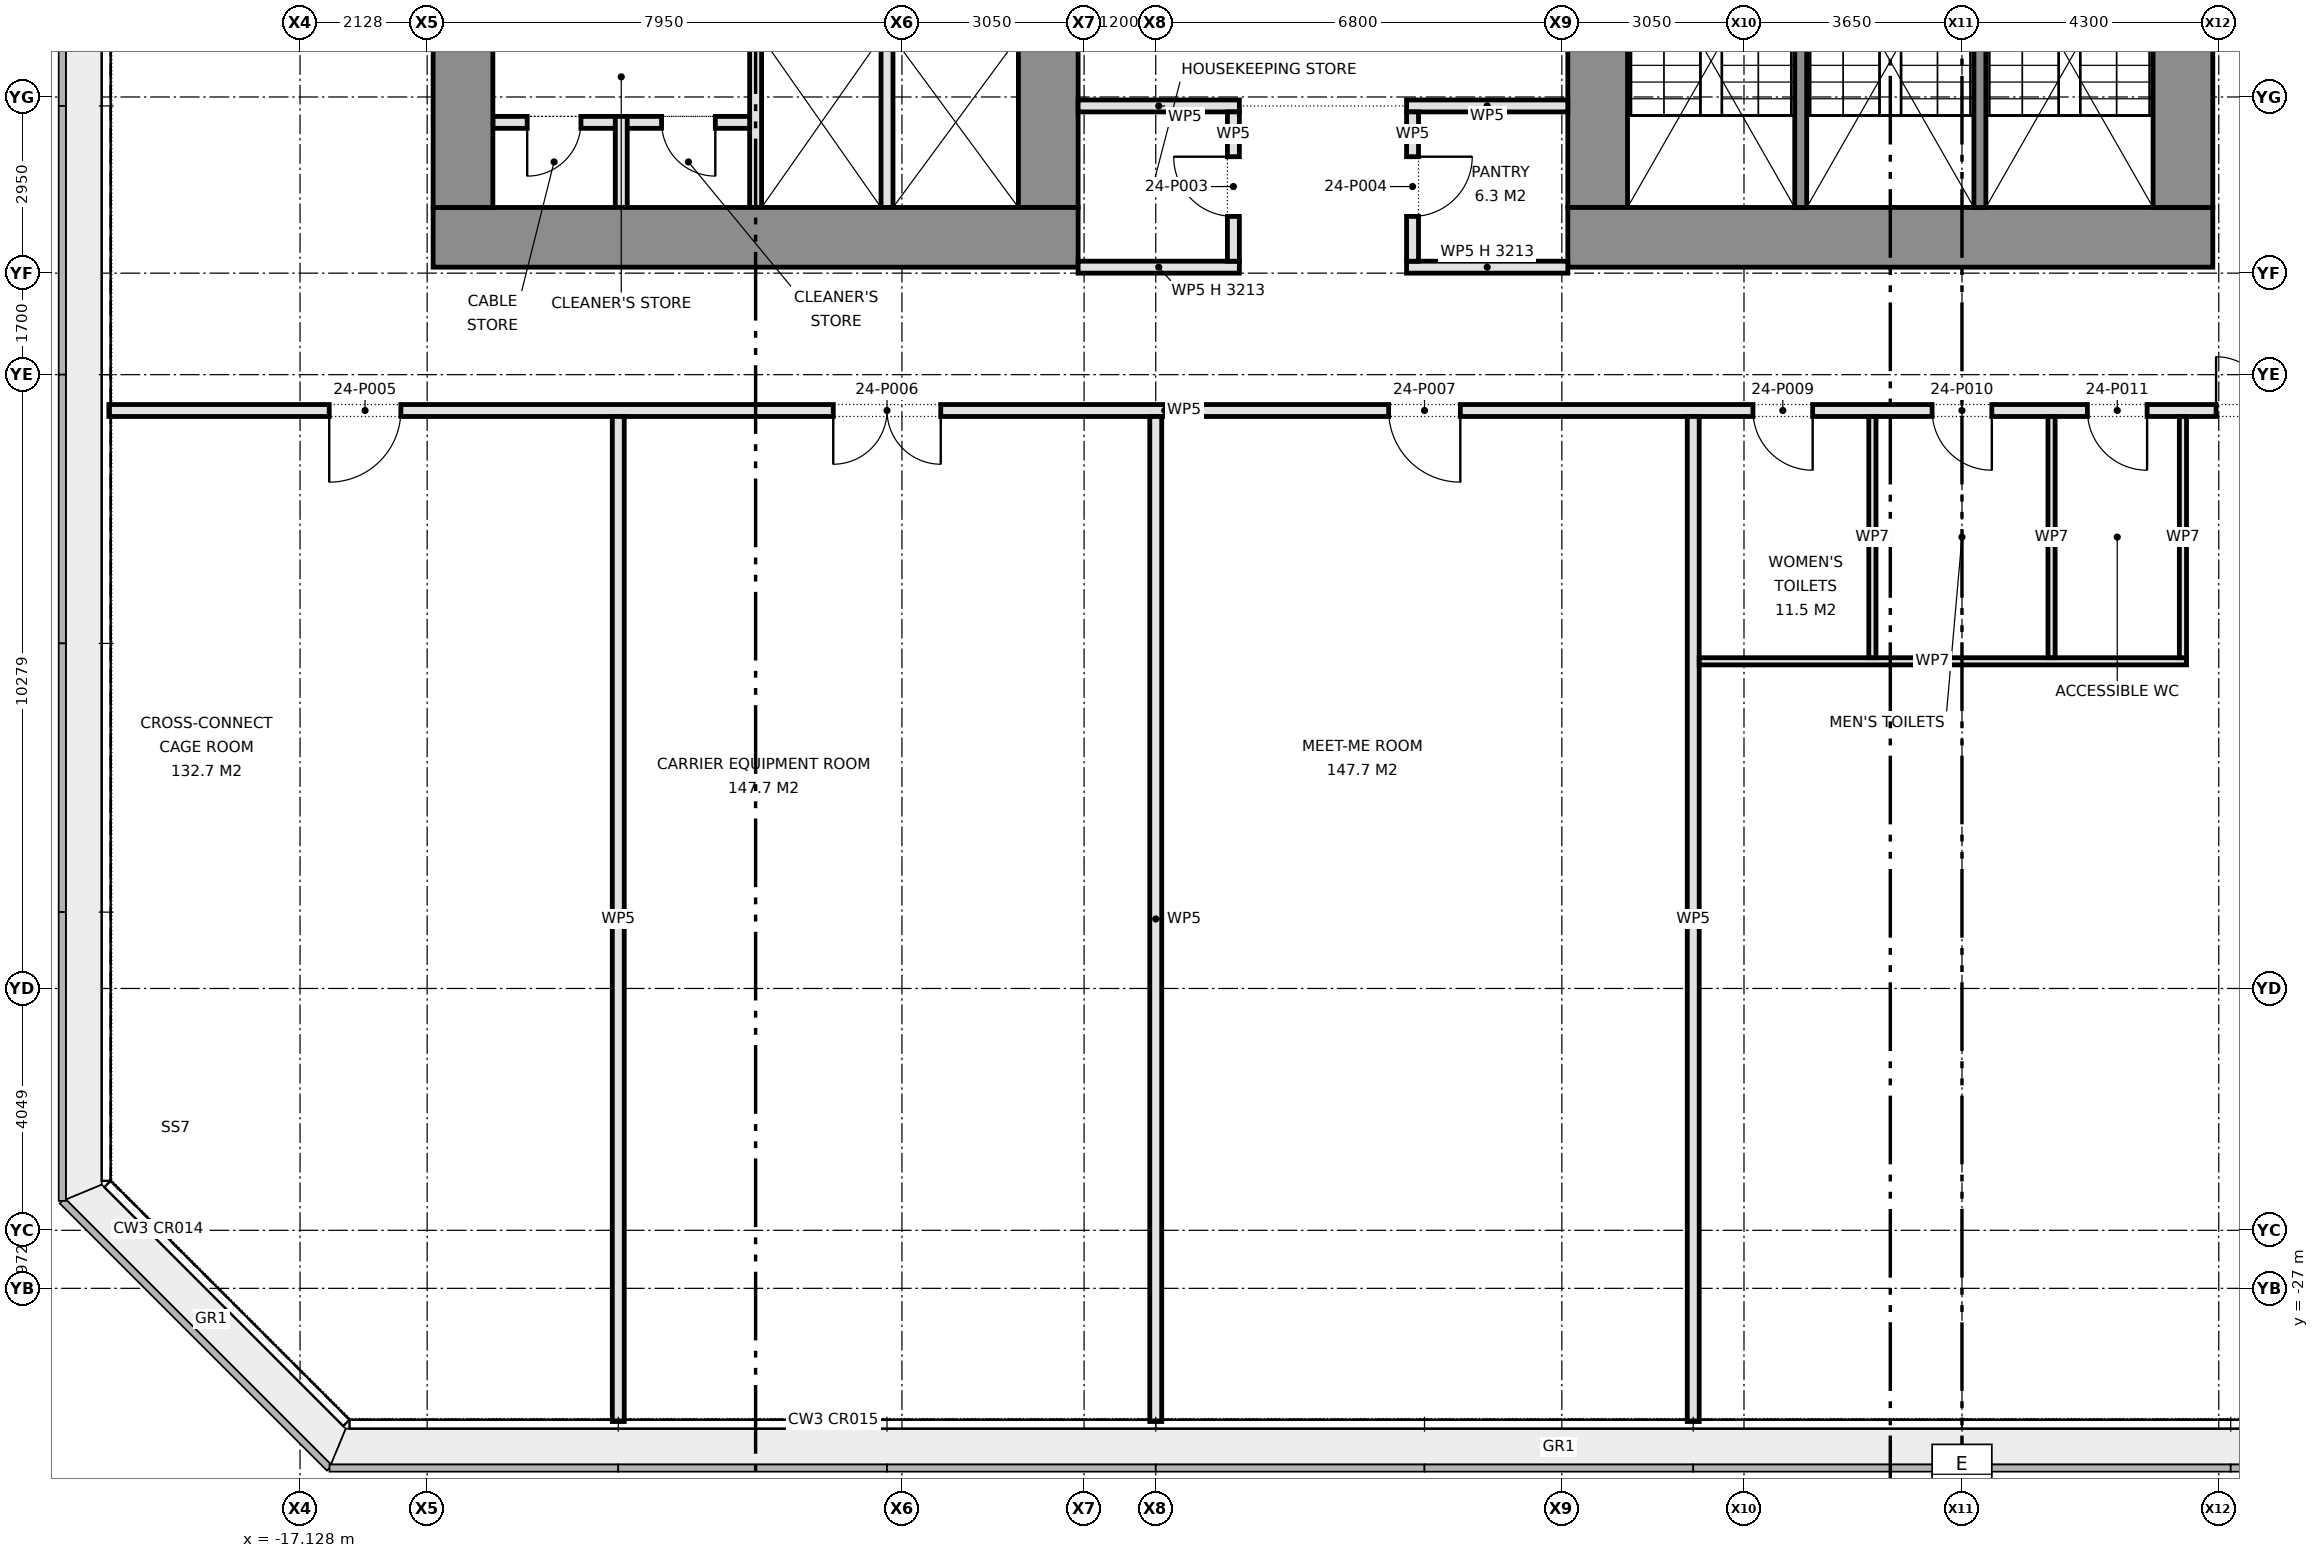
"""IFC4 building model, lengths in metres.
Left out: names, types, materials, properties, quantities, classifications, styles, units other than length and angle.
Written with IfcOpenShell. Run it as: python <this file> out.ifc"""

import sys

from ifc_helpers import new_model, si_unit, direction, frame, frame_2d, origin, place, context, subcontext, project, spatial, rectangle, extrude, element, fill, save


model = new_model("IFC4")
c1 = context("Model", 3, precision=1e-05, world=origin(), true_north=direction((0.0, 1.0)))
c2 = subcontext(c1, "Body", "Model", "MODEL_VIEW")
j1 = project(units=[si_unit("LENGTHUNIT", "METRE"), si_unit("PLANEANGLEUNIT", "RADIAN")], contexts=[c1])
p1 = place(None, origin())
s1 = spatial("IfcSite", under=j1, at=p1, CompositionType="ELEMENT")
p2 = place(p1, origin())
s2 = spatial("IfcBuilding", under=s1, at=p2, CompositionType="ELEMENT")
p3 = place(p2, frame((0.0, 0.0, 108.4)))
s3 = spatial("IfcBuildingStorey", under=s2, at=p3, CompositionType="ELEMENT", Elevation=108.4)
p4 = place(p3, frame((-14.9, -9.4, 0.0), z_axis=(0.0, 0.0, 1.0), x_axis=(1.0, 0.0, 0.0)))
e1 = element("IfcWall", 1, at=p4, inside=s3, PredefinedType="SHEAR", context=c2, shape_type="SweptSolid", body=[
    extrude(rectangle(XDim=10.8, YDim=1.0, at=frame_2d((5.4, 0.0))), origin(), (0.0, 0.0, 1.0), 4.15),
])
for number, where, z_axis, x_axis in (
    (2, (-14.4, -8.9, 0.0), (0.0, 0.0, 1.0), (0.0, 1.0, 0.0)),
    (3, (-4.6, -8.9, 0.0), (0.0, 0.0, 1.0), (0.0, 1.0, 0.0)),
):
    element("IfcWall", number, at=place(p3, frame(where, z_axis=z_axis, x_axis=x_axis)), inside=s3, PredefinedType="SHEAR", context=c2, shape_type="SweptSolid", body=[
        extrude(rectangle(XDim=3.15, YDim=1.0, at=frame_2d((1.575, 0.0))), origin(), (0.0, 0.0, 1.0), 4.15),
    ])
for number, where, z_axis, x_axis in (
    (4, (-9.5, -8.9, 0.0), (0.0, 0.0, 1.0), (0.0, 1.0, 0.0)),
    (5, (-7.3, -8.9, 0.0), (0.0, 0.0, 1.0), (0.0, 1.0, 0.0)),
):
    element("IfcWall", number, at=place(p3, frame(where, z_axis=z_axis, x_axis=x_axis)), inside=s3, PredefinedType="PARTITIONING", context=c2, shape_type="SweptSolid", body=[
        extrude(rectangle(XDim=2.85, YDim=0.2, at=frame_2d((1.425, 0.0))), origin(), (0.0, 0.0, 1.0), 4.15),
    ])
p5 = place(p3, frame((-13.9, -7.475, 0.0), z_axis=(0.0, 0.0, 1.0), x_axis=(1.0, 0.0, 0.0)))
e6 = element("IfcWall", 6, at=p5, inside=s3, PredefinedType="PARTITIONING", context=c2, shape_type="SweptSolid", body=[
    extrude(rectangle(XDim=4.3, YDim=0.2, at=frame_2d((2.15, 0.0))), origin(), (0.0, 0.0, 1.0), 4.15),
])
p6 = place(p5, frame((0.575, 0.0, 0.0)))
e7 = element("IfcOpeningElement", 7, at=p6, cuts=e6, PredefinedType="OPENING", context=c2, shape_type="SweptSolid", body=[
    extrude(rectangle(XDim=0.9, YDim=2.1, at=frame_2d((0.45, 1.05))), frame((0.0, 0.11, 0.0), z_axis=(0.0, -1.0, 0.0), x_axis=(1.0, 0.0, 0.0)), (0.0, 0.0, 1.0), 0.22),
])
p7 = place(p5, frame((2.825, 0.0, 0.0)))
e8 = element("IfcOpeningElement", 8, at=p7, cuts=e6, PredefinedType="OPENING", context=c2, shape_type="SweptSolid", body=[
    extrude(rectangle(XDim=0.9, YDim=2.1, at=frame_2d((0.45, 1.05))), frame((0.0, 0.11, 0.0), z_axis=(0.0, -1.0, 0.0), x_axis=(1.0, 0.0, 0.0)), (0.0, 0.0, 1.0), 0.22),
])
p8 = place(p3, frame((-11.75, -8.9, 0.0), z_axis=(0.0, 0.0, 1.0), x_axis=(0.0, 1.0, 0.0)))
e9 = element("IfcWall", 9, at=p8, inside=s3, PredefinedType="PARTITIONING", context=c2, shape_type="SweptSolid", body=[
    extrude(rectangle(XDim=1.525, YDim=0.2, at=frame_2d((0.762, 0.0))), origin(), (0.0, 0.0, 1.0), 4.15),
])
p9 = place(p3, frame((14.9, -9.4, 0.0), z_axis=(0.0, 0.0, 1.0), x_axis=(-1.0, 0.0, 0.0)))
e10 = element("IfcWall", 10, at=p9, inside=s3, PredefinedType="SHEAR", context=c2, shape_type="SweptSolid", body=[
    extrude(rectangle(XDim=10.8, YDim=1.0, at=frame_2d((5.4, 0.0))), origin(), (0.0, 0.0, 1.0), 4.15),
])
p10 = place(p3, frame((14.4, -3.68, 0.0), z_axis=(0.0, 0.0, 1.0), x_axis=(0.0, -1.0, 0.0)))
e11 = element("IfcWall", 11, at=p10, inside=s3, PredefinedType="SHEAR", context=c2, shape_type="SweptSolid", body=[
    extrude(rectangle(XDim=5.22, YDim=1.0, at=frame_2d((2.61, 0.0))), origin(), (0.0, 0.0, 1.0), 4.15),
])
p11 = place(p3, frame((4.6, -1.55, 0.0), z_axis=(0.0, 0.0, 1.0), x_axis=(0.0, -1.0, 0.0)))
e12 = element("IfcWall", 12, at=p11, inside=s3, PredefinedType="SHEAR", context=c2, shape_type="SweptSolid", body=[
    extrude(rectangle(XDim=7.35, YDim=1.0, at=frame_2d((3.675, 0.0))), origin(), (0.0, 0.0, 1.0), 4.15),
])
for number, where, z_axis, x_axis in (
    (13, (11.0, -2.38, 0.0), (0.0, 0.0, 1.0), (0.0, -1.0, 0.0)),
    (14, (8.0, -2.38, 0.0), (0.0, 0.0, 1.0), (0.0, -1.0, 0.0)),
):
    element("IfcWall", number, at=place(p3, frame(where, z_axis=z_axis, x_axis=x_axis)), inside=s3, PredefinedType="SHEAR", context=c2, shape_type="SweptSolid", body=[
        extrude(rectangle(XDim=6.52, YDim=0.2, at=frame_2d((3.26, 0.0))), origin(), (0.0, 0.0, 1.0), 4.15),
    ])
p12 = place(p3, frame((-20.33, -12.3, 0.0), z_axis=(0.0, 0.0, 1.0), x_axis=(1.0, 0.0, 0.0)))
e15 = element("IfcWall", 15, at=p12, inside=s3, PredefinedType="PARTITIONING", context=c2, shape_type="SweptSolid", body=[
    extrude(rectangle(XDim=37.73, YDim=0.2, at=frame_2d((18.865, 0.0))), origin(), (0.0, 0.0, 1.0), 4.15),
])
p13 = place(p12, frame((3.69, 0.0, 0.0)))
e16 = element("IfcOpeningElement", 16, at=p13, cuts=e15, PredefinedType="OPENING", context=c2, shape_type="SweptSolid", body=[
    extrude(rectangle(XDim=1.2, YDim=2.1, at=frame_2d((0.6, 1.05))), frame((0.0, 0.11, 0.0), z_axis=(0.0, -1.0, 0.0), x_axis=(1.0, 0.0, 0.0)), (0.0, 0.0, 1.0), 0.22),
])
p14 = place(p12, frame((12.13, 0.0, 0.0)))
e17 = element("IfcOpeningElement", 17, at=p14, cuts=e15, PredefinedType="OPENING", context=c2, shape_type="SweptSolid", body=[
    extrude(rectangle(XDim=1.8, YDim=2.1, at=frame_2d((0.9, 1.05))), frame((0.0, 0.11, 0.0), z_axis=(0.0, -1.0, 0.0), x_axis=(1.0, 0.0, 0.0)), (0.0, 0.0, 1.0), 0.22),
])
p15 = place(p12, frame((21.43, 0.0, 0.0)))
e18 = element("IfcOpeningElement", 18, at=p15, cuts=e15, PredefinedType="OPENING", context=c2, shape_type="SweptSolid", body=[
    extrude(rectangle(XDim=1.2, YDim=2.1, at=frame_2d((0.6, 1.05))), frame((0.0, 0.11, 0.0), z_axis=(0.0, -1.0, 0.0), x_axis=(1.0, 0.0, 0.0)), (0.0, 0.0, 1.0), 0.22),
])
p16 = place(p12, frame((35.285, 0.0, 0.0)))
e19 = element("IfcOpeningElement", 19, at=p16, cuts=e15, PredefinedType="OPENING", context=c2, shape_type="SweptSolid", body=[
    extrude(rectangle(XDim=1.8, YDim=2.1, at=frame_2d((0.9, 1.05))), frame((0.0, 0.11, 0.0), z_axis=(0.0, -1.0, 0.0), x_axis=(1.0, 0.0, 0.0)), (0.0, 0.0, 1.0), 0.22),
])
p17 = place(p12, frame((27.53, 0.0, 0.0)))
e20 = element("IfcOpeningElement", 20, at=p17, cuts=e15, PredefinedType="OPENING", context=c2, shape_type="SweptSolid", body=[
    extrude(rectangle(XDim=1.0, YDim=2.1, at=frame_2d((0.5, 1.05))), frame((0.0, 0.11, 0.0), z_axis=(0.0, -1.0, 0.0), x_axis=(1.0, 0.0, 0.0)), (0.0, 0.0, 1.0), 0.22),
])
p18 = place(p12, frame((30.53, 0.0, 0.0)))
e21 = element("IfcOpeningElement", 21, at=p18, cuts=e15, PredefinedType="OPENING", context=c2, shape_type="SweptSolid", body=[
    extrude(rectangle(XDim=1.0, YDim=2.1, at=frame_2d((0.5, 1.05))), frame((0.0, 0.11, 0.0), z_axis=(0.0, -1.0, 0.0), x_axis=(1.0, 0.0, 0.0)), (0.0, 0.0, 1.0), 0.22),
])
p19 = place(p12, frame((33.13, 0.0, 0.0)))
e22 = element("IfcOpeningElement", 22, at=p19, cuts=e15, PredefinedType="OPENING", context=c2, shape_type="SweptSolid", body=[
    extrude(rectangle(XDim=1.0, YDim=2.1, at=frame_2d((0.5, 1.05))), frame((0.0, 0.11, 0.0), z_axis=(0.0, -1.0, 0.0), x_axis=(1.0, 0.0, 0.0)), (0.0, 0.0, 1.0), 0.22),
])
for number, where, z_axis, x_axis in (
    (23, (-4.1, -9.9, 0.0), (0.0, 0.0, 1.0), (1.0, 0.0, 0.0)),
    (24, (1.4, -9.9, 0.0), (0.0, 0.0, 1.0), (1.0, 0.0, 0.0)),
):
    element("IfcWall", number, at=place(p3, frame(where, z_axis=z_axis, x_axis=x_axis)), inside=s3, PredefinedType="PARTITIONING", context=c2, shape_type="SweptSolid", body=[
        extrude(rectangle(XDim=2.7, YDim=0.2, at=frame_2d((1.35, 0.0))), origin(), (0.0, 0.0, 1.0), 3.213),
    ])
for number, where, z_axis, x_axis in (
    (25, (-4.1, -7.2, 0.0), (0.0, 0.0, 1.0), (1.0, 0.0, 0.0)),
    (26, (1.4, -7.2, 0.0), (0.0, 0.0, 1.0), (1.0, 0.0, 0.0)),
):
    element("IfcWall", number, at=place(p3, frame(where, z_axis=z_axis, x_axis=x_axis)), inside=s3, PredefinedType="PARTITIONING", context=c2, shape_type="SweptSolid", body=[
        extrude(rectangle(XDim=2.7, YDim=0.2, at=frame_2d((1.35, 0.0))), origin(), (0.0, 0.0, 1.0), 4.15),
    ])
p20 = place(p3, frame((6.2, -29.23, 0.0), z_axis=(0.0, 0.0, 1.0), x_axis=(0.0, 1.0, 0.0)))
e27 = element("IfcWall", 27, at=p20, inside=s3, PredefinedType="PARTITIONING", context=c2, shape_type="SweptSolid", body=[
    extrude(rectangle(XDim=16.83, YDim=0.2, at=frame_2d((8.415, 0.0))), origin(), (0.0, 0.0, 1.0), 4.15),
])
p21 = place(p3, frame((1.5, -9.8, 0.0), z_axis=(0.0, 0.0, 1.0), x_axis=(0.0, 1.0, 0.0)))
e28 = element("IfcWall", 28, at=p21, inside=s3, PredefinedType="PARTITIONING", context=c2, shape_type="SweptSolid", body=[
    extrude(rectangle(XDim=2.5, YDim=0.2, at=frame_2d((1.25, 0.0))), origin(), (0.0, 0.0, 1.0), 4.15),
])
p22 = place(p21, frame((0.75, 0.0, 0.0)))
e29 = element("IfcOpeningElement", 29, at=p22, cuts=e28, PredefinedType="OPENING", context=c2, shape_type="SweptSolid", body=[
    extrude(rectangle(XDim=1.0, YDim=2.1, at=frame_2d((0.5, 1.05))), frame((0.0, 0.11, 0.0), z_axis=(0.0, -1.0, 0.0), x_axis=(1.0, 0.0, 0.0)), (0.0, 0.0, 1.0), 0.22),
])
p23 = place(p3, frame((-1.5, -9.8, 0.0), z_axis=(0.0, 0.0, 1.0), x_axis=(0.0, 1.0, 0.0)))
e30 = element("IfcWall", 30, at=p23, inside=s3, PredefinedType="PARTITIONING", context=c2, shape_type="SweptSolid", body=[
    extrude(rectangle(XDim=2.5, YDim=0.2, at=frame_2d((1.25, 0.0))), origin(), (0.0, 0.0, 1.0), 4.15),
])
p24 = place(p23, frame((0.75, 0.0, 0.0)))
e31 = element("IfcOpeningElement", 31, at=p24, cuts=e30, PredefinedType="OPENING", context=c2, shape_type="SweptSolid", body=[
    extrude(rectangle(XDim=1.0, YDim=2.1, at=frame_2d((0.5, 1.05))), frame((0.0, 0.11, 0.0), z_axis=(0.0, -1.0, 0.0), x_axis=(1.0, 0.0, 0.0)), (0.0, 0.0, 1.0), 0.22),
])
for number, where, z_axis, x_axis in (
    (32, (-2.8, -29.23, 0.0), (0.0, 0.0, 1.0), (0.0, 1.0, 0.0)),
    (33, (-11.8, -29.23, 0.0), (0.0, 0.0, 1.0), (0.0, 1.0, 0.0)),
):
    element("IfcWall", number, at=place(p3, frame(where, z_axis=z_axis, x_axis=x_axis)), inside=s3, PredefinedType="PARTITIONING", context=c2, shape_type="SweptSolid", body=[
        extrude(rectangle(XDim=16.83, YDim=0.2, at=frame_2d((8.415, 0.0))), origin(), (0.0, 0.0, 1.0), 4.15),
    ])
p25 = place(p3, frame((6.3, -16.5, 0.0), z_axis=(0.0, 0.0, 1.0), x_axis=(1.0, 0.0, 0.0)))
e34 = element("IfcWall", 34, at=p25, inside=s3, PredefinedType="PARTITIONING", context=c2, shape_type="SweptSolid", body=[
    extrude(rectangle(XDim=8.16, YDim=0.12, at=frame_2d((4.08, 0.0))), origin(), (0.0, 0.0, 1.0), 4.15),
])
for number, where, z_axis, x_axis in (
    (35, (14.4, -16.44, 0.0), (0.0, 0.0, 1.0), (0.0, 1.0, 0.0)),
    (36, (12.2, -16.44, 0.0), (0.0, 0.0, 1.0), (0.0, 1.0, 0.0)),
    (37, (9.2, -16.44, 0.0), (0.0, 0.0, 1.0), (0.0, 1.0, 0.0)),
):
    element("IfcWall", number, at=place(p3, frame(where, z_axis=z_axis, x_axis=x_axis)), inside=s3, PredefinedType="PARTITIONING", context=c2, shape_type="SweptSolid", body=[
        extrude(rectangle(XDim=4.04, YDim=0.12, at=frame_2d((2.02, 0.0))), origin(), (0.0, 0.0, 1.0), 4.15),
    ])
p26 = place(p6, frame((0.9, 0.0, 0.0), z_axis=(0.0, 0.0, 1.0), x_axis=(-1.0, 0.0, 0.0)))
e38 = element("IfcDoor", 38, at=p26, inside=s3, OperationType="SINGLE_SWING_RIGHT", PredefinedType="DOOR", context=c2, shape_type="SweptSolid", body=[
    extrude(rectangle(XDim=0.9, YDim=2.1, at=frame_2d((0.45, 1.05))), frame((0.0, 0.025, 0.0), z_axis=(0.0, -1.0, 0.0), x_axis=(1.0, 0.0, 0.0)), (0.0, 0.0, 1.0), 0.05),
])
fill(e7, e38)
p27 = place(p7, frame((0.9, 0.0, 0.0), z_axis=(0.0, 0.0, 1.0), x_axis=(-1.0, 0.0, 0.0)))
e39 = element("IfcDoor", 39, at=p27, inside=s3, OperationType="SINGLE_SWING_LEFT", PredefinedType="DOOR", context=c2, shape_type="SweptSolid", body=[
    extrude(rectangle(XDim=0.9, YDim=2.1, at=frame_2d((0.45, 1.05))), frame((0.0, 0.025, 0.0), z_axis=(0.0, -1.0, 0.0), x_axis=(1.0, 0.0, 0.0)), (0.0, 0.0, 1.0), 0.05),
])
fill(e8, e39)
p28 = place(p24, origin())
e40 = element("IfcDoor", 40, at=p28, inside=s3, OperationType="SINGLE_SWING_RIGHT", PredefinedType="DOOR", context=c2, shape_type="SweptSolid", body=[
    extrude(rectangle(XDim=1.0, YDim=2.1, at=frame_2d((0.5, 1.05))), frame((0.0, 0.025, 0.0), z_axis=(0.0, -1.0, 0.0), x_axis=(1.0, 0.0, 0.0)), (0.0, 0.0, 1.0), 0.05),
])
fill(e31, e40)
p29 = place(p22, frame((1.0, 0.0, 0.0), z_axis=(0.0, 0.0, 1.0), x_axis=(-1.0, 0.0, 0.0)))
e41 = element("IfcDoor", 41, at=p29, inside=s3, OperationType="SINGLE_SWING_LEFT", PredefinedType="DOOR", context=c2, shape_type="SweptSolid", body=[
    extrude(rectangle(XDim=1.0, YDim=2.1, at=frame_2d((0.5, 1.05))), frame((0.0, 0.025, 0.0), z_axis=(0.0, -1.0, 0.0), x_axis=(1.0, 0.0, 0.0)), (0.0, 0.0, 1.0), 0.05),
])
fill(e29, e41)
p30 = place(p13, frame((1.2, 0.0, 0.0), z_axis=(0.0, 0.0, 1.0), x_axis=(-1.0, 0.0, 0.0)))
e42 = element("IfcDoor", 42, at=p30, inside=s3, OperationType="SINGLE_SWING_RIGHT", PredefinedType="DOOR", context=c2, shape_type="SweptSolid", body=[
    extrude(rectangle(XDim=1.2, YDim=2.1, at=frame_2d((0.6, 1.05))), frame((0.0, 0.025, 0.0), z_axis=(0.0, -1.0, 0.0), x_axis=(1.0, 0.0, 0.0)), (0.0, 0.0, 1.0), 0.05),
])
fill(e16, e42)
p31 = place(p14, frame((1.8, 0.0, 0.0), z_axis=(0.0, 0.0, 1.0), x_axis=(-1.0, 0.0, 0.0)))
e43 = element("IfcDoor", 43, at=p31, inside=s3, OperationType="DOUBLE_DOOR_SINGLE_SWING", PredefinedType="DOOR", context=c2, shape_type="SweptSolid", body=[
    extrude(rectangle(XDim=1.8, YDim=2.1, at=frame_2d((0.9, 1.05))), frame((0.0, 0.025, 0.0), z_axis=(0.0, -1.0, 0.0), x_axis=(1.0, 0.0, 0.0)), (0.0, 0.0, 1.0), 0.05),
])
fill(e17, e43)
p32 = place(p15, frame((1.2, 0.0, 0.0), z_axis=(0.0, 0.0, 1.0), x_axis=(-1.0, 0.0, 0.0)))
e44 = element("IfcDoor", 44, at=p32, inside=s3, OperationType="SINGLE_SWING_LEFT", PredefinedType="DOOR", context=c2, shape_type="SweptSolid", body=[
    extrude(rectangle(XDim=1.2, YDim=2.1, at=frame_2d((0.6, 1.05))), frame((0.0, 0.025, 0.0), z_axis=(0.0, -1.0, 0.0), x_axis=(1.0, 0.0, 0.0)), (0.0, 0.0, 1.0), 0.05),
])
fill(e18, e44)
p33 = place(p16, origin())
e45 = element("IfcDoor", 45, at=p33, inside=s3, OperationType="DOUBLE_DOOR_SINGLE_SWING", PredefinedType="DOOR", context=c2, shape_type="SweptSolid", body=[
    extrude(rectangle(XDim=1.8, YDim=2.1, at=frame_2d((0.9, 1.05))), frame((0.0, 0.025, 0.0), z_axis=(0.0, -1.0, 0.0), x_axis=(1.0, 0.0, 0.0)), (0.0, 0.0, 1.0), 0.05),
])
fill(e19, e45)
p34 = place(p17, frame((1.0, 0.0, 0.0), z_axis=(0.0, 0.0, 1.0), x_axis=(-1.0, 0.0, 0.0)))
e46 = element("IfcDoor", 46, at=p34, inside=s3, OperationType="SINGLE_SWING_LEFT", PredefinedType="DOOR", context=c2, shape_type="SweptSolid", body=[
    extrude(rectangle(XDim=1.0, YDim=2.1, at=frame_2d((0.5, 1.05))), frame((0.0, 0.025, 0.0), z_axis=(0.0, -1.0, 0.0), x_axis=(1.0, 0.0, 0.0)), (0.0, 0.0, 1.0), 0.05),
])
fill(e20, e46)
p35 = place(p18, frame((1.0, 0.0, 0.0), z_axis=(0.0, 0.0, 1.0), x_axis=(-1.0, 0.0, 0.0)))
e47 = element("IfcDoor", 47, at=p35, inside=s3, OperationType="SINGLE_SWING_LEFT", PredefinedType="DOOR", context=c2, shape_type="SweptSolid", body=[
    extrude(rectangle(XDim=1.0, YDim=2.1, at=frame_2d((0.5, 1.05))), frame((0.0, 0.025, 0.0), z_axis=(0.0, -1.0, 0.0), x_axis=(1.0, 0.0, 0.0)), (0.0, 0.0, 1.0), 0.05),
])
fill(e21, e47)
p36 = place(p19, frame((1.0, 0.0, 0.0), z_axis=(0.0, 0.0, 1.0), x_axis=(-1.0, 0.0, 0.0)))
e48 = element("IfcDoor", 48, at=p36, inside=s3, OperationType="SINGLE_SWING_LEFT", PredefinedType="DOOR", context=c2, shape_type="SweptSolid", body=[
    extrude(rectangle(XDim=1.0, YDim=2.1, at=frame_2d((0.5, 1.05))), frame((0.0, 0.025, 0.0), z_axis=(0.0, -1.0, 0.0), x_axis=(1.0, 0.0, 0.0)), (0.0, 0.0, 1.0), 0.05),
])
fill(e22, e48)
save(model, sys.argv[1])
